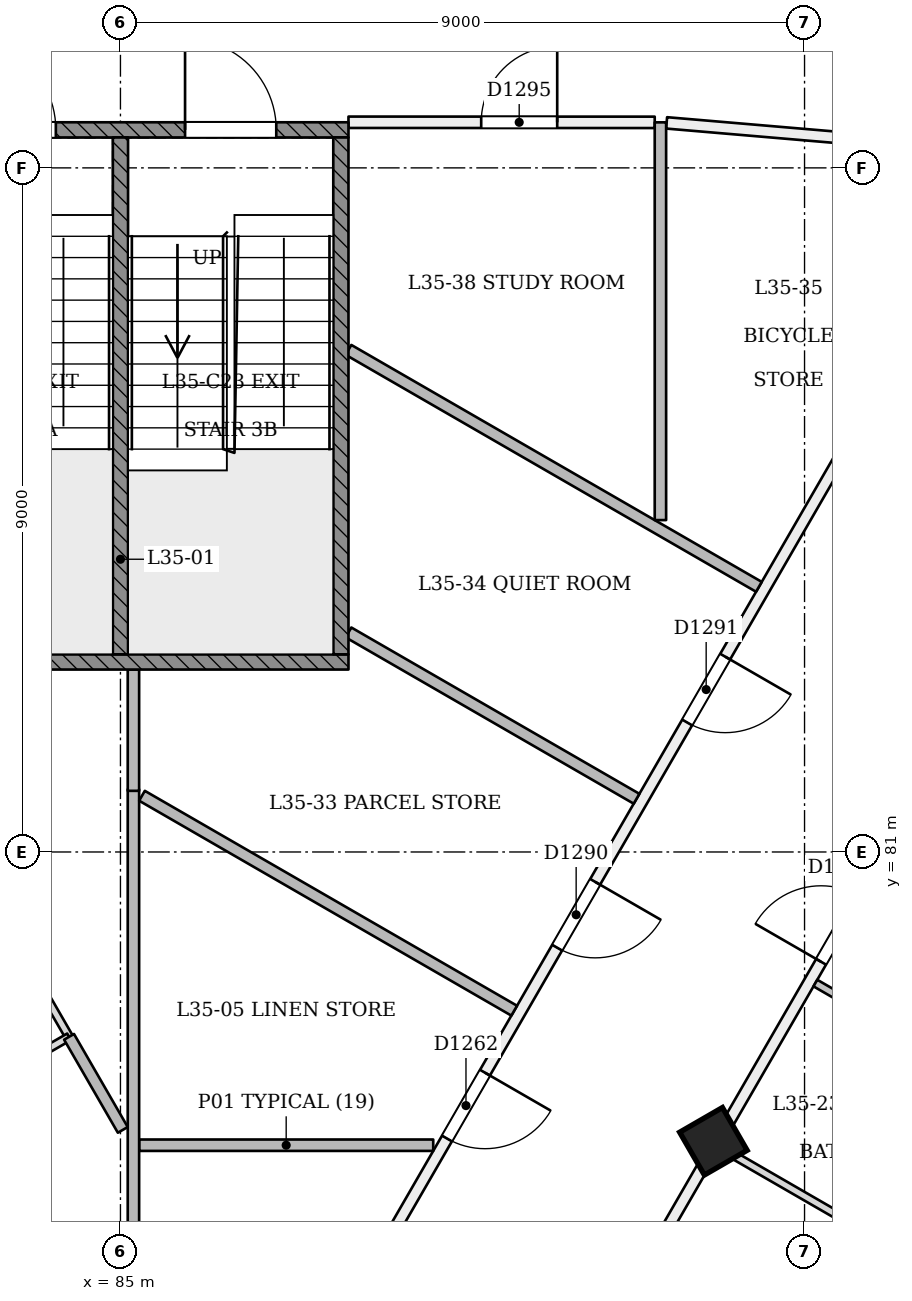
"""IFC4 building model, lengths in metres.
Left out: names, types, materials, properties, quantities, classifications, styles, units other than length and angle.
Written with IfcOpenShell. Run it as: python <this file> out.ifc"""

import sys

from ifc_helpers import new_model, si_unit, direction, frame, frame_2d, origin, origin_2d, place, context, subcontext, project, spatial, rectangle, extrude, element, fill, save


model = new_model("IFC4")
c1 = context("Model", 3, precision=1e-05, world=origin(), true_north=direction((0.0, 1.0)))
c2 = subcontext(c1, "Body", "Model", "MODEL_VIEW")
j1 = project(units=[si_unit("LENGTHUNIT", "METRE"), si_unit("PLANEANGLEUNIT", "RADIAN")], contexts=[c1])
p1 = place(None, origin())
s1 = spatial("IfcSite", under=j1, at=p1, CompositionType="ELEMENT")
p2 = place(p1, origin())
s2 = spatial("IfcBuilding", under=s1, at=p2, CompositionType="ELEMENT")
p3 = place(p2, frame((0.0, 0.0, 138.6)))
s3 = spatial("IfcBuildingStorey", under=s2, at=p3, CompositionType="ELEMENT", Elevation=138.6)
p4 = place(p3, frame((92.828, 77.147, -0.02), z_axis=(-0.022222852987, 0.038483477124, 0.999012095419), x_axis=(-0.500171937123, -0.865640990042, 0.022219578635)))
e1 = element("IfcColumn", 1, at=p4, inside=s3, PredefinedType="COLUMN", context=c2, shape_type="SweptSolid", body=[
    extrude(rectangle(XDim=0.65, YDim=0.65, at=origin_2d()), origin(), (0.0, 0.0, 1.0), 3.604),
])
p5 = place(p3, frame((84.935, 69.902, 0.0), z_axis=(0.0, 0.0, 1.0), x_axis=(-0.499997468525, 0.866026865327, 0.0)))
e2 = element("IfcWall", 2, at=p5, inside=s3, PredefinedType="PARTITIONING", context=c2, shape_type="SweptSolid", body=[
    extrude(rectangle(XDim=23.438, YDim=0.15, at=frame_2d((11.719, 0.0))), origin(), (0.0, 0.0, 1.0), 3.15),
])
p6 = place(p5, frame((8.864, 0.0, 0.0)))
e3 = element("IfcOpeningElement", 3, at=p6, cuts=e2, PredefinedType="OPENING", context=c2, shape_type="SweptSolid", body=[
    extrude(rectangle(XDim=0.9, YDim=2.1, at=frame_2d((0.45, 1.05))), frame((0.0, 0.085, 0.0), z_axis=(0.0, -1.0, 0.0), x_axis=(1.0, 0.0, 0.0)), (0.0, 0.0, 1.0), 0.171),
])
p7 = place(p5, frame((11.872, 0.0, 0.0)))
e4 = element("IfcOpeningElement", 4, at=p7, cuts=e2, PredefinedType="OPENING", context=c2, shape_type="SweptSolid", body=[
    extrude(rectangle(XDim=0.9, YDim=2.1, at=frame_2d((0.45, 1.05))), frame((0.0, 0.085, 0.0), z_axis=(0.0, -1.0, 0.0), x_axis=(1.0, 0.0, 0.0)), (0.0, 0.0, 1.0), 0.171),
])
p8 = place(p5, frame((4.368, 0.0, 0.0)))
e5 = element("IfcOpeningElement", 5, at=p8, cuts=e2, PredefinedType="OPENING", context=c2, shape_type="SweptSolid", body=[
    extrude(rectangle(XDim=1.2, YDim=2.1, at=frame_2d((0.6, 1.05))), frame((0.0, 0.085, 0.0), z_axis=(0.0, -1.0, 0.0), x_axis=(1.0, 0.0, 0.0)), (0.0, 0.0, 1.0), 0.171),
])
p9 = place(p5, frame((15.479, 0.0, 0.0)))
e6 = element("IfcOpeningElement", 6, at=p9, cuts=e2, PredefinedType="OPENING", context=c2, shape_type="SweptSolid", body=[
    extrude(rectangle(XDim=1.0, YDim=2.1, at=frame_2d((0.5, 1.05))), frame((0.0, 0.085, 0.0), z_axis=(0.0, -1.0, 0.0), x_axis=(1.0, 0.0, 0.0)), (0.0, 0.0, 1.0), 0.171),
])
p10 = place(p5, frame((19.877, 0.0, 0.0)))
e7 = element("IfcOpeningElement", 7, at=p10, cuts=e2, PredefinedType="OPENING", context=c2, shape_type="SweptSolid", body=[
    extrude(rectangle(XDim=1.0, YDim=2.1, at=frame_2d((0.5, 1.05))), frame((0.0, 0.085, 0.0), z_axis=(0.0, -1.0, 0.0), x_axis=(1.0, 0.0, 0.0)), (0.0, 0.0, 1.0), 0.171),
])
p11 = place(p3, frame((96.784, 90.2, 0.0), z_axis=(0.0, 0.0, 1.0), x_axis=(-0.499996251233, -0.866027568125, 0.0)))
e8 = element("IfcWall", 8, at=p11, inside=s3, PredefinedType="PARTITIONING", context=c2, shape_type="SweptSolid", body=[
    extrude(rectangle(XDim=23.568, YDim=0.15, at=frame_2d((11.784, 0.0))), origin(), (0.0, 0.0, 1.0), 3.15),
])
p12 = place(p11, frame((17.972, 0.0, 0.0)))
e9 = element("IfcOpeningElement", 9, at=p12, cuts=e8, PredefinedType="OPENING", context=c2, shape_type="SweptSolid", body=[
    extrude(rectangle(XDim=1.0, YDim=2.1, at=frame_2d((0.5, 1.05))), frame((0.0, 0.085, 0.0), z_axis=(0.0, -1.0, 0.0), x_axis=(1.0, 0.0, 0.0)), (0.0, 0.0, 1.0), 0.171),
])
p13 = place(p11, frame((13.976, 0.0, 0.0)))
e10 = element("IfcOpeningElement", 10, at=p13, cuts=e8, PredefinedType="OPENING", context=c2, shape_type="SweptSolid", body=[
    extrude(rectangle(XDim=1.0, YDim=2.1, at=frame_2d((0.5, 1.05))), frame((0.0, 0.085, 0.0), z_axis=(0.0, -1.0, 0.0), x_axis=(1.0, 0.0, 0.0)), (0.0, 0.0, 1.0), 0.171),
])
p14 = place(p11, frame((11.077, 0.0, 0.0)))
e11 = element("IfcOpeningElement", 11, at=p14, cuts=e8, PredefinedType="OPENING", context=c2, shape_type="SweptSolid", body=[
    extrude(rectangle(XDim=1.0, YDim=2.1, at=frame_2d((0.5, 1.05))), frame((0.0, 0.085, 0.0), z_axis=(0.0, -1.0, 0.0), x_axis=(1.0, 0.0, 0.0)), (0.0, 0.0, 1.0), 0.171),
])
p15 = place(p11, frame((7.656, 0.0, 0.0)))
e12 = element("IfcOpeningElement", 12, at=p15, cuts=e8, PredefinedType="OPENING", context=c2, shape_type="SweptSolid", body=[
    extrude(rectangle(XDim=1.0, YDim=2.1, at=frame_2d((0.5, 1.05))), frame((0.0, 0.085, 0.0), z_axis=(0.0, -1.0, 0.0), x_axis=(1.0, 0.0, 0.0)), (0.0, 0.0, 1.0), 0.171),
])
p16 = place(p11, frame((2.832, 0.0, 0.0)))
e13 = element("IfcOpeningElement", 13, at=p16, cuts=e8, PredefinedType="OPENING", context=c2, shape_type="SweptSolid", body=[
    extrude(rectangle(XDim=1.0, YDim=2.1, at=frame_2d((0.5, 1.05))), frame((0.0, 0.085, 0.0), z_axis=(0.0, -1.0, 0.0), x_axis=(1.0, 0.0, 0.0)), (0.0, 0.0, 1.0), 0.171),
])
p17 = place(p3, frame((64.899, 98.406, 0.0), z_axis=(0.0, 0.0, 1.0), x_axis=(0.499995137693, -0.86602821102, 0.0)))
e14 = element("IfcWall", 14, at=p17, inside=s3, PredefinedType="PARTITIONING", context=c2, shape_type="SweptSolid", body=[
    extrude(rectangle(XDim=40.094, YDim=0.15, at=frame_2d((20.047, 0.0))), origin(), (0.0, 0.0, 1.0), 2.75),
])
p18 = place(p17, frame((0.2, 0.0, 0.0)))
e15 = element("IfcOpeningElement", 15, at=p18, cuts=e14, PredefinedType="OPENING", context=c2, shape_type="SweptSolid", body=[
    extrude(rectangle(XDim=1.2, YDim=2.1, at=frame_2d((0.6, 1.05))), frame((0.0, 0.085, 0.0), z_axis=(0.0, -1.0, 0.0), x_axis=(1.0, 0.0, 0.0)), (0.0, 0.0, 1.0), 0.171),
])
p19 = place(p17, frame((9.442, 0.0, 0.0)))
e16 = element("IfcOpeningElement", 16, at=p19, cuts=e14, PredefinedType="OPENING", context=c2, shape_type="SweptSolid", body=[
    extrude(rectangle(XDim=1.0, YDim=2.1, at=frame_2d((0.5, 1.05))), frame((0.0, 0.085, 0.0), z_axis=(0.0, -1.0, 0.0), x_axis=(1.0, 0.0, 0.0)), (0.0, 0.0, 1.0), 0.171),
])
p20 = place(p17, frame((11.652, 0.0, 0.0)))
e17 = element("IfcOpeningElement", 17, at=p20, cuts=e14, PredefinedType="OPENING", context=c2, shape_type="SweptSolid", body=[
    extrude(rectangle(XDim=1.0, YDim=2.1, at=frame_2d((0.5, 1.05))), frame((0.0, 0.085, 0.0), z_axis=(0.0, -1.0, 0.0), x_axis=(1.0, 0.0, 0.0)), (0.0, 0.0, 1.0), 0.171),
])
p21 = place(p17, frame((19.447, 0.0, 0.0)))
e18 = element("IfcOpeningElement", 18, at=p21, cuts=e14, PredefinedType="OPENING", context=c2, shape_type="SweptSolid", body=[
    extrude(rectangle(XDim=1.2, YDim=2.1, at=frame_2d((0.6, 1.05))), frame((0.0, 0.085, 0.0), z_axis=(0.0, -1.0, 0.0), x_axis=(1.0, 0.0, 0.0)), (0.0, 0.0, 1.0), 0.171),
])
p22 = place(p17, frame((27.327, 0.0, 0.0)))
e19 = element("IfcOpeningElement", 19, at=p22, cuts=e14, PredefinedType="OPENING", context=c2, shape_type="SweptSolid", body=[
    extrude(rectangle(XDim=1.0, YDim=2.1, at=frame_2d((0.5, 1.05))), frame((0.0, 0.085, 0.0), z_axis=(0.0, -1.0, 0.0), x_axis=(1.0, 0.0, 0.0)), (0.0, 0.0, 1.0), 0.171),
])
p23 = place(p17, frame((31.847, 0.0, 0.0)))
e20 = element("IfcOpeningElement", 20, at=p23, cuts=e14, PredefinedType="OPENING", context=c2, shape_type="SweptSolid", body=[
    extrude(rectangle(XDim=1.2, YDim=2.1, at=frame_2d((0.6, 1.05))), frame((0.0, 0.085, 0.0), z_axis=(0.0, -1.0, 0.0), x_axis=(1.0, 0.0, 0.0)), (0.0, 0.0, 1.0), 0.171),
])
p24 = place(p17, frame((38.558, 0.0, 0.0)))
e21 = element("IfcOpeningElement", 21, at=p24, cuts=e14, PredefinedType="OPENING", context=c2, shape_type="SweptSolid", body=[
    extrude(rectangle(XDim=1.0, YDim=2.1, at=frame_2d((0.5, 1.05))), frame((0.0, 0.085, 0.0), z_axis=(0.0, -1.0, 0.0), x_axis=(1.0, 0.0, 0.0)), (0.0, 0.0, 1.0), 0.171),
])
p25 = place(p3, frame((85.054, 63.684, 0.0), z_axis=(0.0, 0.0, 1.0), x_axis=(0.499999704591, 0.866025574339, 0.0)))
e22 = element("IfcWall", 22, at=p25, inside=s3, PredefinedType="PARTITIONING", context=c2, shape_type="SweptSolid", body=[
    extrude(rectangle(XDim=40.094, YDim=0.15, at=frame_2d((20.047, 0.0))), origin(), (0.0, 0.0, 1.0), 2.75),
])
p26 = place(p25, frame((0.506, 0.0, 0.0)))
e23 = element("IfcOpeningElement", 23, at=p26, cuts=e22, PredefinedType="OPENING", context=c2, shape_type="SweptSolid", body=[
    extrude(rectangle(XDim=1.2, YDim=2.1, at=frame_2d((0.6, 1.05))), frame((0.0, 0.085, 0.0), z_axis=(0.0, -1.0, 0.0), x_axis=(1.0, 0.0, 0.0)), (0.0, 0.0, 1.0), 0.171),
])
p27 = place(p25, frame((2.767, 0.0, 0.0)))
e24 = element("IfcOpeningElement", 24, at=p27, cuts=e22, PredefinedType="OPENING", context=c2, shape_type="SweptSolid", body=[
    extrude(rectangle(XDim=1.0, YDim=2.1, at=frame_2d((0.5, 1.05))), frame((0.0, 0.085, 0.0), z_axis=(0.0, -1.0, 0.0), x_axis=(1.0, 0.0, 0.0)), (0.0, 0.0, 1.0), 0.171),
])
p28 = place(p25, frame((8.297, 0.0, 0.0)))
e25 = element("IfcOpeningElement", 25, at=p28, cuts=e22, PredefinedType="OPENING", context=c2, shape_type="SweptSolid", body=[
    extrude(rectangle(XDim=1.0, YDim=2.1, at=frame_2d((0.5, 1.05))), frame((0.0, 0.085, 0.0), z_axis=(0.0, -1.0, 0.0), x_axis=(1.0, 0.0, 0.0)), (0.0, 0.0, 1.0), 0.171),
])
p29 = place(p25, frame((11.652, 0.0, 0.0)))
e26 = element("IfcOpeningElement", 26, at=p29, cuts=e22, PredefinedType="OPENING", context=c2, shape_type="SweptSolid", body=[
    extrude(rectangle(XDim=1.0, YDim=2.1, at=frame_2d((0.5, 1.05))), frame((0.0, 0.085, 0.0), z_axis=(0.0, -1.0, 0.0), x_axis=(1.0, 0.0, 0.0)), (0.0, 0.0, 1.0), 0.171),
])
p30 = place(p25, frame((18.327, 0.0, 0.0)))
e27 = element("IfcOpeningElement", 27, at=p30, cuts=e22, PredefinedType="OPENING", context=c2, shape_type="SweptSolid", body=[
    extrude(rectangle(XDim=1.0, YDim=2.1, at=frame_2d((0.5, 1.05))), frame((0.0, 0.085, 0.0), z_axis=(0.0, -1.0, 0.0), x_axis=(1.0, 0.0, 0.0)), (0.0, 0.0, 1.0), 0.171),
])
p31 = place(p25, frame((20.767, 0.0, 0.0)))
e28 = element("IfcOpeningElement", 28, at=p31, cuts=e22, PredefinedType="OPENING", context=c2, shape_type="SweptSolid", body=[
    extrude(rectangle(XDim=1.0, YDim=2.1, at=frame_2d((0.5, 1.05))), frame((0.0, 0.085, 0.0), z_axis=(0.0, -1.0, 0.0), x_axis=(1.0, 0.0, 0.0)), (0.0, 0.0, 1.0), 0.171),
])
p32 = place(p25, frame((26.297, 0.0, 0.0)))
e29 = element("IfcOpeningElement", 29, at=p32, cuts=e22, PredefinedType="OPENING", context=c2, shape_type="SweptSolid", body=[
    extrude(rectangle(XDim=1.0, YDim=2.1, at=frame_2d((0.5, 1.05))), frame((0.0, 0.085, 0.0), z_axis=(0.0, -1.0, 0.0), x_axis=(1.0, 0.0, 0.0)), (0.0, 0.0, 1.0), 0.171),
])
p33 = place(p25, frame((31.847, 0.0, 0.0)))
e30 = element("IfcOpeningElement", 30, at=p33, cuts=e22, PredefinedType="OPENING", context=c2, shape_type="SweptSolid", body=[
    extrude(rectangle(XDim=1.2, YDim=2.1, at=frame_2d((0.6, 1.05))), frame((0.0, 0.085, 0.0), z_axis=(0.0, -1.0, 0.0), x_axis=(1.0, 0.0, 0.0)), (0.0, 0.0, 1.0), 0.171),
])
p34 = place(p25, frame((38.694, 0.0, 0.0)))
e31 = element("IfcOpeningElement", 31, at=p34, cuts=e22, PredefinedType="OPENING", context=c2, shape_type="SweptSolid", body=[
    extrude(rectangle(XDim=1.2, YDim=2.1, at=frame_2d((0.6, 1.05))), frame((0.0, 0.085, 0.0), z_axis=(0.0, -1.0, 0.0), x_axis=(1.0, 0.0, 0.0)), (0.0, 0.0, 1.0), 0.171),
])
p35 = place(p3, frame((92.185, 90.592, 0.0), z_axis=(0.0, 0.0, 1.0), x_axis=(0.996384428795, -0.08495922584, 0.0)))
e32 = element("IfcWall", 32, at=p35, inside=s3, PredefinedType="PARTITIONING", context=c2, shape_type="SweptSolid", body=[
    extrude(rectangle(XDim=4.497, YDim=0.15, at=frame_2d((2.249, 0.0))), origin(), (0.0, 0.0, 1.0), 3.15),
])
p36 = place(p3, frame((88.0, 90.6, 0.0), z_axis=(0.0, 0.0, 1.0), x_axis=(0.999999970626, -0.000242380166, 0.0)))
e33 = element("IfcWall", 33, at=p36, inside=s3, PredefinedType="PARTITIONING", context=c2, shape_type="SweptSolid", body=[
    extrude(rectangle(XDim=4.029, YDim=0.15, at=frame_2d((2.015, 0.0))), origin(), (0.0, 0.0, 1.0), 3.15),
])
p37 = place(p36, frame((1.746, 0.0, 0.0)))
e34 = element("IfcOpeningElement", 34, at=p37, cuts=e33, PredefinedType="OPENING", context=c2, shape_type="SweptSolid", body=[
    extrude(rectangle(XDim=1.0, YDim=2.1, at=frame_2d((0.5, 1.05))), frame((0.0, 0.085, 0.0), z_axis=(0.0, -1.0, 0.0), x_axis=(1.0, 0.0, 0.0)), (0.0, 0.0, 1.0), 0.171),
])
p38 = place(p3, frame((84.334, 78.551, 0.0), z_axis=(0.0, 0.0, 1.0), x_axis=(-0.500002829465, 0.866023770186, 0.0)))
e35 = element("IfcWall", 35, at=p38, inside=s3, PredefinedType="PARTITIONING", context=c2, shape_type="SweptSolid", body=[
    extrude(rectangle(XDim=6.055, YDim=0.1, at=frame_2d((3.028, 0.0))), origin(), (0.0, 0.0, 1.0), 3.15),
])
p39 = place(p3, frame((81.095, 76.704, 0.0), z_axis=(0.0, 0.0, 1.0), x_axis=(0.866014403787, 0.50001905207, 0.0)))
e36 = element("IfcWall", 36, at=p39, inside=s3, PredefinedType="PARTITIONING", context=c2, shape_type="SweptSolid", body=[
    extrude(rectangle(XDim=3.729, YDim=0.1, at=frame_2d((1.864, 0.0))), origin(), (0.0, 0.0, 1.0), 3.15),
])
p40 = place(p3, frame((89.115, 77.142, 0.0), z_axis=(0.0, 0.0, 1.0), x_axis=(-1.0, 0.0, 0.0)))
e37 = element("IfcWall", 37, at=p40, inside=s3, PredefinedType="PARTITIONING", context=c2, shape_type="SweptSolid", body=[
    extrude(rectangle(XDim=3.869, YDim=0.15, at=frame_2d((1.935, 0.0))), origin(), (0.0, 0.0, 1.0), 3.15),
])
p41 = place(p3, frame((85.171, 81.824, 0.0), z_axis=(0.0, 0.0, 1.0), x_axis=(0.0, -1.0, 0.0)))
e38 = element("IfcWall", 38, at=p41, inside=s3, PredefinedType="PARTITIONING", context=c2, shape_type="SweptSolid", body=[
    extrude(rectangle(XDim=11.459, YDim=0.15, at=frame_2d((5.729, 0.0))), origin(), (0.0, 0.0, 1.0), 3.15),
])
p42 = place(p3, frame((90.18, 78.912, 0.0), z_axis=(0.0, 0.0, 1.0), x_axis=(-0.866015900655, 0.500016459542, 0.0)))
e39 = element("IfcWall", 39, at=p42, inside=s3, PredefinedType="PARTITIONING", context=c2, shape_type="SweptSolid", body=[
    extrude(rectangle(XDim=5.655, YDim=0.15, at=frame_2d((2.827, 0.0))), origin(), (0.0, 0.0, 1.0), 3.15),
])
p43 = place(p3, frame((95.339, 75.698, 0.0), z_axis=(0.0, 0.0, 1.0), x_axis=(-0.866011447264, 0.500024172624, 0.0)))
e40 = element("IfcWall", 40, at=p43, inside=s3, PredefinedType="PARTITIONING", context=c2, shape_type="SweptSolid", body=[
    extrude(rectangle(XDim=2.825, YDim=0.1, at=frame_2d((1.413, 0.0))), origin(), (0.0, 0.0, 1.0), 2.75),
])
p44 = place(p3, frame((94.143, 79.275, 0.0), z_axis=(0.0, 0.0, 1.0), x_axis=(0.866011447264, -0.500024172624, 0.0)))
e41 = element("IfcWall", 41, at=p44, inside=s3, PredefinedType="PARTITIONING", context=c2, shape_type="SweptSolid", body=[
    extrude(rectangle(XDim=2.825, YDim=0.1, at=frame_2d((1.413, 0.0))), origin(), (0.0, 0.0, 1.0), 3.15),
])
p45 = place(p44, frame((0.925, 0.0, 0.0)))
e42 = element("IfcOpeningElement", 42, at=p45, cuts=e41, PredefinedType="OPENING", context=c2, shape_type="SweptSolid", body=[
    extrude(rectangle(XDim=0.9, YDim=2.1, at=frame_2d((0.45, 1.05))), frame((0.0, 0.061, 0.0), z_axis=(0.0, -1.0, 0.0), x_axis=(1.0, 0.0, 0.0)), (0.0, 0.0, 1.0), 0.121),
])
p46 = place(p3, frame((84.324, 78.568, 0.0), z_axis=(0.0, 0.0, 1.0), x_axis=(0.499946688677, -0.866056180903, 0.0)))
e43 = element("IfcWall", 43, at=p46, inside=s3, PredefinedType="PARTITIONING", context=c2, shape_type="SweptSolid", body=[
    extrude(rectangle(XDim=1.414, YDim=0.15, at=frame_2d((0.707, 0.0))), origin(), (0.0, 0.0, 1.0), 3.15),
])
p47 = place(p3, frame((85.171, 81.804, 0.0), z_axis=(0.0, 0.0, 1.0), x_axis=(0.0, 1.0, 0.0)))
e44 = element("IfcWall", 44, at=p47, inside=s3, PredefinedType="PARTITIONING", context=c2, shape_type="SweptSolid", body=[
    extrude(rectangle(XDim=1.595, YDim=0.15, at=frame_2d((0.798, 0.0))), origin(), (0.0, 0.0, 1.0), 3.15),
])
p48 = place(p3, frame((91.79, 81.7, 0.0), z_axis=(0.0, 0.0, 1.0), x_axis=(-0.866006276197, 0.50003312849, 0.0)))
e45 = element("IfcWall", 45, at=p48, inside=s3, PredefinedType="PARTITIONING", context=c2, shape_type="SweptSolid", body=[
    extrude(rectangle(XDim=4.376, YDim=0.15, at=frame_2d((2.188, 0.0))), origin(), (0.0, 0.0, 1.0), 3.15),
])
p49 = place(p3, frame((93.4, 84.488, 0.0), z_axis=(0.0, 0.0, 1.0), x_axis=(-0.866029742693, 0.499992484715, 0.0)))
e46 = element("IfcWall", 46, at=p49, inside=s3, PredefinedType="PARTITIONING", context=c2, shape_type="SweptSolid", body=[
    extrude(rectangle(XDim=6.235, YDim=0.15, at=frame_2d((3.117, 0.0))), origin(), (0.0, 0.0, 1.0), 3.15),
])
p50 = place(p3, frame((92.104, 90.599, 0.0), z_axis=(0.0, 0.0, 1.0), x_axis=(0.0, -1.0, 0.0)))
e47 = element("IfcWall", 47, at=p50, inside=s3, PredefinedType="PARTITIONING", context=c2, shape_type="SweptSolid", body=[
    extrude(rectangle(XDim=5.233, YDim=0.15, at=frame_2d((2.616, 0.0))), origin(), (0.0, 0.0, 1.0), 3.15),
])
p51 = place(p3, frame((82.0, 90.5, 0.0), z_axis=(0.0, 0.0, 1.0), x_axis=(1.0, 0.0, 0.0)))
e48 = element("IfcWall", 48, at=p51, inside=s3, PredefinedType="SOLIDWALL", context=c2, shape_type="SweptSolid", body=[
    extrude(rectangle(XDim=6.0, YDim=0.2, at=frame_2d((3.0, 0.0))), origin(), (0.0, 0.0, 1.0), 3.15),
])
p52 = place(p51, frame((0.95, 0.0, 0.0)))
e49 = element("IfcOpeningElement", 49, at=p52, cuts=e48, PredefinedType="OPENING", context=c2, shape_type="SweptSolid", body=[
    extrude(rectangle(XDim=1.2, YDim=2.1, at=frame_2d((0.6, 1.05))), frame((0.0, 0.11, 0.0), z_axis=(0.0, -1.0, 0.0), x_axis=(1.0, 0.0, 0.0)), (0.0, 0.0, 1.0), 0.221),
])
p53 = place(p51, frame((3.85, 0.0, 0.0)))
e50 = element("IfcOpeningElement", 50, at=p53, cuts=e48, PredefinedType="OPENING", context=c2, shape_type="SweptSolid", body=[
    extrude(rectangle(XDim=1.2, YDim=2.1, at=frame_2d((0.6, 1.05))), frame((0.0, 0.11, 0.0), z_axis=(0.0, -1.0, 0.0), x_axis=(1.0, 0.0, 0.0)), (0.0, 0.0, 1.0), 0.221),
])
p54 = place(p3, frame((82.0, 83.5, 0.0), z_axis=(0.0, 0.0, 1.0), x_axis=(1.0, 0.0, 0.0)))
e51 = element("IfcWall", 51, at=p54, inside=s3, PredefinedType="SOLIDWALL", context=c2, shape_type="SweptSolid", body=[
    extrude(rectangle(XDim=6.0, YDim=0.2, at=frame_2d((3.0, 0.0))), origin(), (0.0, 0.0, 1.0), 3.15),
])
for number, where, z_axis, x_axis in (
    (52, (87.9, 83.6, 0.0), (0.0, 0.0, 1.0), (0.0, 1.0, 0.0)),
    (53, (85.0, 83.6, 0.0), (0.0, 0.0, 1.0), (0.0, 1.0, 0.0)),
):
    element("IfcWall", number, at=place(p3, frame(where, z_axis=z_axis, x_axis=x_axis)), inside=s3, PredefinedType="SOLIDWALL", context=c2, shape_type="SweptSolid", body=[
        extrude(rectangle(XDim=6.8, YDim=0.2, at=frame_2d((3.4, 0.0))), origin(), (0.0, 0.0, 1.0), 3.15),
    ])
p55 = place(p13, origin())
e54 = element("IfcDoor", 54, at=p55, inside=s3, OperationType="SINGLE_SWING_LEFT", PredefinedType="NOTDEFINED", context=c2, shape_type="SweptSolid", body=[
    extrude(rectangle(XDim=1.0, YDim=2.1, at=frame_2d((0.5, 1.05))), frame((0.0, 0.025, 0.0), z_axis=(0.0, -1.0, 0.0), x_axis=(1.0, 0.0, 0.0)), (0.0, 0.0, 1.0), 0.05),
])
fill(e10, e54)
p56 = place(p30, origin())
e55 = element("IfcDoor", 55, at=p56, inside=s3, OperationType="SINGLE_SWING_LEFT", PredefinedType="NOTDEFINED", context=c2, shape_type="SweptSolid", body=[
    extrude(rectangle(XDim=1.0, YDim=2.1, at=frame_2d((0.5, 1.05))), frame((0.0, 0.025, 0.0), z_axis=(0.0, -1.0, 0.0), x_axis=(1.0, 0.0, 0.0)), (0.0, 0.0, 1.0), 0.05),
])
fill(e27, e55)
p57 = place(p14, origin())
e56 = element("IfcDoor", 56, at=p57, inside=s3, OperationType="SINGLE_SWING_LEFT", PredefinedType="NOTDEFINED", context=c2, shape_type="SweptSolid", body=[
    extrude(rectangle(XDim=1.0, YDim=2.1, at=frame_2d((0.5, 1.05))), frame((0.0, 0.025, 0.0), z_axis=(0.0, -1.0, 0.0), x_axis=(1.0, 0.0, 0.0)), (0.0, 0.0, 1.0), 0.05),
])
fill(e11, e56)
p58 = place(p15, origin())
e57 = element("IfcDoor", 57, at=p58, inside=s3, OperationType="SINGLE_SWING_LEFT", PredefinedType="NOTDEFINED", context=c2, shape_type="SweptSolid", body=[
    extrude(rectangle(XDim=1.0, YDim=2.1, at=frame_2d((0.5, 1.05))), frame((0.0, 0.025, 0.0), z_axis=(0.0, -1.0, 0.0), x_axis=(1.0, 0.0, 0.0)), (0.0, 0.0, 1.0), 0.05),
])
fill(e12, e57)
p59 = place(p37, origin())
e58 = element("IfcDoor", 58, at=p59, inside=s3, OperationType="SINGLE_SWING_RIGHT", PredefinedType="NOTDEFINED", context=c2, shape_type="SweptSolid", body=[
    extrude(rectangle(XDim=1.0, YDim=2.1, at=frame_2d((0.5, 1.05))), frame((0.0, 0.025, 0.0), z_axis=(0.0, -1.0, 0.0), x_axis=(1.0, 0.0, 0.0)), (0.0, 0.0, 1.0), 0.05),
])
fill(e34, e58)
p60 = place(p52, origin())
e59 = element("IfcDoor", 59, at=p60, inside=s3, OperationType="SINGLE_SWING_LEFT", PredefinedType="NOTDEFINED", context=c2, shape_type="SweptSolid", body=[
    extrude(rectangle(XDim=1.2, YDim=2.1, at=frame_2d((0.6, 1.05))), frame((0.0, 0.025, 0.0), z_axis=(0.0, -1.0, 0.0), x_axis=(1.0, 0.0, 0.0)), (0.0, 0.0, 1.0), 0.05),
])
fill(e49, e59)
p61 = place(p53, origin())
e60 = element("IfcDoor", 60, at=p61, inside=s3, OperationType="SINGLE_SWING_LEFT", PredefinedType="NOTDEFINED", context=c2, shape_type="SweptSolid", body=[
    extrude(rectangle(XDim=1.2, YDim=2.1, at=frame_2d((0.6, 1.05))), frame((0.0, 0.025, 0.0), z_axis=(0.0, -1.0, 0.0), x_axis=(1.0, 0.0, 0.0)), (0.0, 0.0, 1.0), 0.05),
])
fill(e50, e60)
save(model, sys.argv[1])
